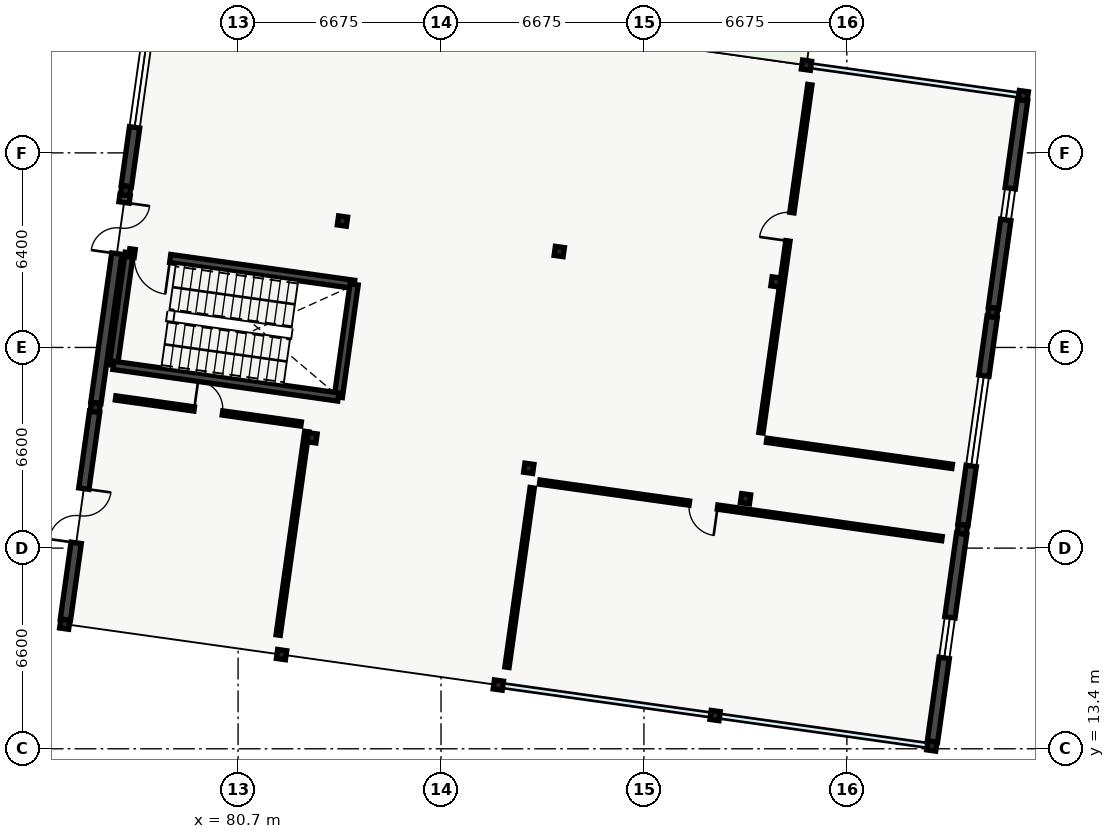
"""IFC4 building model, lengths in metres.
Left out: names, types, materials, properties, quantities, classifications, styles, units other than length and angle.
Written with IfcOpenShell. Run it as: python <this file> out.ifc"""

import sys

from ifc_helpers import new_model, si_unit, direction, frame, frame_2d, origin, origin_2d, place, context, subcontext, project, spatial, rectangle, i_section, extrude, element, fill, save


model = new_model("IFC4")
c1 = context("Model", 3, precision=1e-05, world=origin(), true_north=direction((0.0, 1.0)))
c2 = subcontext(c1, "Body", "Model", "MODEL_VIEW")
j1 = project(units=[si_unit("LENGTHUNIT", "METRE"), si_unit("PLANEANGLEUNIT", "RADIAN")], contexts=[c1])
p1 = place(None, origin())
s1 = spatial("IfcSite", under=j1, at=p1, CompositionType="ELEMENT")
p2 = place(p1, origin())
s2 = spatial("IfcBuilding", under=s1, at=p2, CompositionType="ELEMENT")
p3 = place(p2, origin())
s3 = spatial("IfcBuildingStorey", under=s2, at=p3, CompositionType="ELEMENT", Elevation=0.0)
for number, where, z_axis, x_axis in (
    (1, (75.0, 17.5, 0.0), (0.0, 0.0, 1.0), (0.99, -0.139, 0.0)),
    (2, (76.002, 24.63, 0.0), (0.0, 0.0, 1.0), (0.99, -0.139, 0.0)),
    (3, (77.004, 31.76, 0.0), (0.0, 0.0, 1.0), (0.99, -0.139, 0.0)),
    (4, (82.13, 16.498, 0.0), (0.0, 0.0, 1.0), (0.99, -0.139, 0.0)),
    (5, (83.132, 23.628, 0.0), (0.0, 0.0, 1.0), (0.99, -0.139, 0.0)),
    (6, (84.134, 30.758, 0.0), (0.0, 0.0, 1.0), (0.99, -0.139, 0.0)),
    (7, (89.26, 15.496, 0.0), (0.0, 0.0, 1.0), (0.99, -0.139, 0.0)),
    (8, (90.262, 22.626, 0.0), (0.0, 0.0, 1.0), (0.99, -0.139, 0.0)),
    (9, (91.264, 29.756, 0.0), (0.0, 0.0, 1.0), (0.99, -0.139, 0.0)),
    (10, (96.39, 14.494, 0.0), (0.0, 0.0, 1.0), (0.99, -0.139, 0.0)),
    (11, (97.392, 21.624, 0.0), (0.0, 0.0, 1.0), (0.99, -0.139, 0.0)),
    (12, (98.394, 28.754, 0.0), (0.0, 0.0, 1.0), (0.99, -0.139, 0.0)),
    (13, (99.396, 35.884, 0.0), (0.0, 0.0, 1.0), (0.99, -0.139, 0.0)),
    (14, (103.52, 13.492, 0.0), (0.0, 0.0, 1.0), (0.99, -0.139, 0.0)),
    (15, (104.522, 20.622, 0.0), (0.0, 0.0, 1.0), (0.99, -0.139, 0.0)),
    (16, (105.524, 27.752, 0.0), (0.0, 0.0, 1.0), (0.99, -0.139, 0.0)),
    (17, (106.526, 34.882, 0.0), (0.0, 0.0, 1.0), (0.99, -0.139, 0.0)),
):
    element("IfcColumn", number, at=place(p3, frame(where, z_axis=z_axis, x_axis=x_axis)), inside=s3, PredefinedType="COLUMN", context=c2, shape_type="SweptSolid", body=[
        extrude(i_section(OverallWidth=0.3, OverallDepth=0.3, WebThickness=0.011, FlangeThickness=0.019, at=origin_2d()), origin(), (0.0, 0.0, 1.0), 4.92),
    ])
p4 = place(p3, frame((75.02, 17.644, 0.0), z_axis=(0.0, 0.0, 1.0), x_axis=(0.139170380644, 0.990268451053, 0.0)))
e18 = element("IfcWall", 18, at=p4, inside=s3, PredefinedType="SOLIDWALL", context=c2, shape_type="SweptSolid", body=[
    extrude(rectangle(XDim=6.91, YDim=0.34, at=frame_2d((3.455, 0.0))), origin(), (0.0, 0.0, 1.0), 4.705),
])
p5 = place(p4, frame((2.555, 0.0, 0.0)))
e19 = element("IfcOpeningElement", 19, at=p5, cuts=e18, PredefinedType="OPENING", context=c2, shape_type="SweptSolid", body=[
    extrude(rectangle(XDim=1.8, YDim=2.25, at=frame_2d((0.9, 1.125))), frame((0.0, 0.17, 0.0), z_axis=(0.0, -1.0, 0.0), x_axis=(1.0, 0.0, 0.0)), (0.0, 0.0, 1.0), 0.34),
])
p6 = place(p3, frame((76.022, 24.773, 0.0), z_axis=(0.0, 0.0, 1.0), x_axis=(0.139170380644, 0.990268451053, 0.0)))
e20 = element("IfcWall", 20, at=p6, inside=s3, PredefinedType="SOLIDWALL", context=c2, shape_type="SweptSolid", body=[
    extrude(rectangle(XDim=6.91, YDim=0.34, at=frame_2d((3.455, 0.0))), origin(), (0.0, 0.0, 1.0), 4.705),
])
p7 = place(p6, frame((4.96, 0.0, 0.0)))
e21 = element("IfcOpeningElement", 21, at=p7, cuts=e20, PredefinedType="OPENING", context=c2, shape_type="SweptSolid", body=[
    extrude(rectangle(XDim=1.7, YDim=2.2, at=frame_2d((0.85, 1.1))), frame((0.0, 0.17, 0.0), z_axis=(0.0, -1.0, 0.0), x_axis=(1.0, 0.0, 0.0)), (0.0, 0.0, 1.0), 0.34),
])
p8 = place(p3, frame((77.024, 31.904, 0.0), z_axis=(0.0, 0.0, 1.0), x_axis=(0.139175250046, 0.990267766705, 0.0)))
e22 = element("IfcWall", 22, at=p8, inside=s3, PredefinedType="SOLIDWALL", context=c2, shape_type="SweptSolid", body=[
    extrude(rectangle(XDim=6.91, YDim=0.34, at=frame_2d((3.455, 0.0))), origin(), (0.0, 0.0, 1.0), 4.705),
])
p9 = place(p8, frame((1.955, 0.0, 0.95)))
e23 = element("IfcOpeningElement", 23, at=p9, cuts=e22, PredefinedType="OPENING", context=c2, shape_type="SweptSolid", body=[
    extrude(rectangle(XDim=3.0, YDim=1.65, at=frame_2d((1.5, 0.825))), frame((0.0, 0.17, 0.0), z_axis=(0.0, -1.0, 0.0), x_axis=(1.0, 0.0, 0.0)), (0.0, 0.0, 1.0), 0.34),
])
p10 = place(p3, frame((106.506, 34.738, 0.0), z_axis=(0.0, 0.0, 1.0), x_axis=(-0.139170380644, -0.990268451053, 0.0)))
e24 = element("IfcWall", 24, at=p10, inside=s3, PredefinedType="SOLIDWALL", context=c2, shape_type="SweptSolid", body=[
    extrude(rectangle(XDim=6.91, YDim=0.34, at=frame_2d((3.455, 0.0))), origin(), (0.0, 0.0, 1.0), 4.705),
])
p11 = place(p10, frame((2.93, 0.0, 0.95)))
e25 = element("IfcOpeningElement", 25, at=p11, cuts=e24, PredefinedType="OPENING", context=c2, shape_type="SweptSolid", body=[
    extrude(rectangle(XDim=1.05, YDim=1.2, at=frame_2d((0.525, 0.6))), frame((0.0, 0.17, 0.0), z_axis=(0.0, -1.0, 0.0), x_axis=(1.0, 0.0, 0.0)), (0.0, 0.0, 1.0), 0.34),
])
p12 = place(p3, frame((105.504, 27.608, 0.0), z_axis=(0.0, 0.0, 1.0), x_axis=(-0.139170380644, -0.990268451053, 0.0)))
e26 = element("IfcWall", 26, at=p12, inside=s3, PredefinedType="SOLIDWALL", context=c2, shape_type="SweptSolid", body=[
    extrude(rectangle(XDim=6.91, YDim=0.34, at=frame_2d((3.455, 0.0))), origin(), (0.0, 0.0, 1.0), 4.705),
])
p13 = place(p12, frame((1.955, 0.0, 0.95)))
e27 = element("IfcOpeningElement", 27, at=p13, cuts=e26, PredefinedType="OPENING", context=c2, shape_type="SweptSolid", body=[
    extrude(rectangle(XDim=3.0, YDim=1.65, at=frame_2d((1.5, 0.825))), frame((0.0, 0.17, 0.0), z_axis=(0.0, -1.0, 0.0), x_axis=(1.0, 0.0, 0.0)), (0.0, 0.0, 1.0), 0.34),
])
p14 = place(p3, frame((104.502, 20.478, 0.0), z_axis=(0.0, 0.0, 1.0), x_axis=(-0.139205027475, -0.990263581238, 0.0)))
e28 = element("IfcWall", 28, at=p14, inside=s3, PredefinedType="SOLIDWALL", context=c2, shape_type="SweptSolid", body=[
    extrude(rectangle(XDim=6.91, YDim=0.34, at=frame_2d((3.455, 0.0))), origin(), (0.0, 0.0, 1.0), 4.705),
])
p15 = place(p14, frame((2.78, 0.0, 0.95)))
e29 = element("IfcOpeningElement", 29, at=p15, cuts=e28, PredefinedType="OPENING", context=c2, shape_type="SweptSolid", body=[
    extrude(rectangle(XDim=1.35, YDim=1.8, at=frame_2d((0.675, 0.9))), frame((0.0, 0.17, 0.0), z_axis=(0.0, -1.0, 0.0), x_axis=(1.0, 0.0, 0.0)), (0.0, 0.0, 1.0), 0.34),
])
p16 = place(p3, frame((76.6, 26.01, 0.0), z_axis=(0.0, 0.0, 1.0), x_axis=(0.139172815303, 0.990268108888, 0.0)))
e30 = element("IfcWall", 30, at=p16, inside=s3, PredefinedType="SHEAR", context=c2, shape_type="SweptSolid", body=[
    extrude(rectangle(XDim=3.74, YDim=0.27, at=frame_2d((1.87, 0.0))), origin(), (0.0, 0.0, 1.0), 4.88),
])
p17 = place(p3, frame((77.12, 29.714, 0.0), z_axis=(0.0, 0.0, 1.0), x_axis=(0.990265308789, -0.139192737628, 0.0)))
e31 = element("IfcWall", 31, at=p17, inside=s3, PredefinedType="SHEAR", context=c2, shape_type="SweptSolid", body=[
    extrude(rectangle(XDim=7.47, YDim=0.27, at=frame_2d((3.735, 0.0))), origin(), (0.0, 0.0, 1.0), 4.88),
])
p18 = place(p17, frame((0.18, 0.0, 0.0)))
e32 = element("IfcOpeningElement", 32, at=p18, cuts=e31, PredefinedType="OPENING", context=c2, shape_type="SweptSolid", body=[
    extrude(rectangle(XDim=1.18, YDim=2.15, at=frame_2d((0.59, 1.075))), frame((0.0, 0.135, 0.0), z_axis=(0.0, -1.0, 0.0), x_axis=(1.0, 0.0, 0.0)), (0.0, 0.0, 1.0), 0.27),
])
p19 = place(p3, frame((84.518, 28.674, 0.0), z_axis=(0.0, 0.0, 1.0), x_axis=(-0.139172815303, -0.990268108888, 0.0)))
e33 = element("IfcWall", 33, at=p19, inside=s3, PredefinedType="SHEAR", context=c2, shape_type="SweptSolid", body=[
    extrude(rectangle(XDim=3.74, YDim=0.27, at=frame_2d((1.87, 0.0))), origin(), (0.0, 0.0, 1.0), 4.88),
])
p20 = place(p3, frame((83.997, 24.97, 0.0), z_axis=(0.0, 0.0, 1.0), x_axis=(-0.990265308789, 0.139192737628, 0.0)))
e34 = element("IfcWall", 34, at=p20, inside=s3, PredefinedType="SHEAR", context=c2, shape_type="SweptSolid", body=[
    extrude(rectangle(XDim=7.47, YDim=0.27, at=frame_2d((3.735, 0.0))), origin(), (0.0, 0.0, 1.0), 4.88),
])
p21 = place(p3, frame((82.018, 17.14, 0.0), z_axis=(0.0, 0.0, 1.0), x_axis=(0.139186215649, 0.990266225504, 0.0)))
e35 = element("IfcWall", 35, at=p21, inside=s3, PredefinedType="PARTITIONING", context=c2, shape_type="SweptSolid", body=[
    extrude(rectangle(XDim=6.76, YDim=0.14, at=frame_2d((3.38, 0.0))), origin(), (0.0, 0.0, 1.0), 4.55),
])
p22 = place(p3, frame((82.772, 24.083, 0.0), z_axis=(0.0, 0.0, 1.0), x_axis=(-0.990271090706, 0.139151596873, 0.0)))
e36 = element("IfcWall", 36, at=p22, inside=s3, PredefinedType="PARTITIONING", context=c2, shape_type="SweptSolid", body=[
    extrude(rectangle(XDim=6.16, YDim=0.14, at=frame_2d((3.08, 0.0))), origin(), (0.0, 0.0, 1.0), 4.55),
])
p23 = place(p22, frame((2.61, 0.0, 0.0)))
e37 = element("IfcOpeningElement", 37, at=p23, cuts=e36, PredefinedType="OPENING", context=c2, shape_type="SweptSolid", body=[
    extrude(rectangle(XDim=0.94, YDim=2.12, at=frame_2d((0.47, 1.06))), frame((0.0, 0.07, 0.0), z_axis=(0.0, -1.0, 0.0), x_axis=(1.0, 0.0, 0.0)), (0.0, 0.0, 1.0), 0.14),
])
p24 = place(p3, frame((103.852, 20.312, 0.0), z_axis=(0.0, 0.0, 1.0), x_axis=(-0.990267836617, 0.139174752605, 0.0)))
e38 = element("IfcWall", 38, at=p24, inside=s3, PredefinedType="PARTITIONING", context=c2, shape_type="SweptSolid", body=[
    extrude(rectangle(XDim=13.36, YDim=0.14, at=frame_2d((6.68, 0.0))), origin(), (0.0, 0.0, 1.0), 4.55),
])
p25 = place(p24, frame((7.452, 0.0, 0.0)))
e39 = element("IfcOpeningElement", 39, at=p25, cuts=e38, PredefinedType="OPENING", context=c2, shape_type="SweptSolid", body=[
    extrude(rectangle(XDim=0.94, YDim=2.12, at=frame_2d((0.47, 1.06))), frame((0.0, 0.07, 0.0), z_axis=(0.0, -1.0, 0.0), x_axis=(1.0, 0.0, 0.0)), (0.0, 0.0, 1.0), 0.14),
])
p26 = place(p3, frame((90.374, 21.984, 0.0), z_axis=(0.0, 0.0, 1.0), x_axis=(-0.139190185652, -0.990265667494, 0.0)))
e40 = element("IfcWall", 40, at=p26, inside=s3, PredefinedType="PARTITIONING", context=c2, shape_type="SweptSolid", body=[
    extrude(rectangle(XDim=5.96, YDim=0.14, at=frame_2d((2.98, 0.0))), origin(), (0.0, 0.0, 1.0), 4.55),
])
p27 = place(p3, frame((98.086, 23.546, 0.0), z_axis=(0.0, 0.0, 1.0), x_axis=(0.990264860737, -0.139195925191, 0.0)))
e41 = element("IfcWall", 41, at=p27, inside=s3, PredefinedType="PARTITIONING", context=c2, shape_type="SweptSolid", body=[
    extrude(rectangle(XDim=6.16, YDim=0.14, at=frame_2d((3.08, 0.0))), origin(), (0.0, 0.0, 1.0), 4.55),
])
p28 = place(p3, frame((99.508, 35.242, 0.0), z_axis=(0.0, 0.0, 1.0), x_axis=(-0.139176845422, -0.990267542485, 0.0)))
e42 = element("IfcWall", 42, at=p28, inside=s3, PredefinedType="PARTITIONING", context=c2, shape_type="SweptSolid", body=[
    extrude(rectangle(XDim=11.56, YDim=0.14, at=frame_2d((5.78, 0.0))), origin(), (0.0, 0.0, 1.0), 3.66),
])
p29 = place(p28, frame((4.248, 0.0, 0.0)))
e43 = element("IfcOpeningElement", 43, at=p29, cuts=e42, PredefinedType="OPENING", context=c2, shape_type="SweptSolid", body=[
    extrude(rectangle(XDim=0.94, YDim=2.12, at=frame_2d((0.47, 1.06))), frame((0.0, 0.07, 0.0), z_axis=(0.0, -1.0, 0.0), x_axis=(1.0, 0.0, 0.0)), (0.0, 0.0, 1.0), 0.14),
])
p30 = place(p5, origin())
e44 = element("IfcDoor", 44, at=p30, inside=s3, OperationType="DOUBLE_DOOR_SINGLE_SWING", PredefinedType="DOOR", context=c2, shape_type="SweptSolid", body=[
    extrude(rectangle(XDim=1.8, YDim=2.25, at=frame_2d((0.9, 1.125))), frame((0.0, 0.025, 0.0), z_axis=(0.0, -1.0, 0.0), x_axis=(1.0, 0.0, 0.0)), (0.0, 0.0, 1.0), 0.05),
])
fill(e19, e44)
p31 = place(p7, origin())
e45 = element("IfcDoor", 45, at=p31, inside=s3, OperationType="DOUBLE_DOOR_SINGLE_SWING", PredefinedType="DOOR", context=c2, shape_type="SweptSolid", body=[
    extrude(rectangle(XDim=1.7, YDim=2.2, at=frame_2d((0.85, 1.1))), frame((0.0, 0.025, 0.0), z_axis=(0.0, -1.0, 0.0), x_axis=(1.0, 0.0, 0.0)), (0.0, 0.0, 1.0), 0.05),
])
fill(e21, e45)
p32 = place(p9, origin())
e46 = element("IfcWindow", 46, at=p32, inside=s3, PartitioningType="SINGLE_PANEL", PredefinedType="WINDOW", context=c2, shape_type="SweptSolid", body=[
    extrude(rectangle(XDim=3.0, YDim=1.65, at=frame_2d((1.5, 0.825))), frame((0.0, 0.03, 0.0), z_axis=(0.0, -1.0, 0.0), x_axis=(1.0, 0.0, 0.0)), (0.0, 0.0, 1.0), 0.06),
])
fill(e23, e46)
p33 = place(p11, origin())
e47 = element("IfcWindow", 47, at=p33, inside=s3, PartitioningType="SINGLE_PANEL", PredefinedType="WINDOW", context=c2, shape_type="SweptSolid", body=[
    extrude(rectangle(XDim=1.05, YDim=1.2, at=frame_2d((0.525, 0.6))), frame((0.0, 0.03, 0.0), z_axis=(0.0, -1.0, 0.0), x_axis=(1.0, 0.0, 0.0)), (0.0, 0.0, 1.0), 0.06),
])
fill(e25, e47)
p34 = place(p13, origin())
e48 = element("IfcWindow", 48, at=p34, inside=s3, PartitioningType="SINGLE_PANEL", PredefinedType="WINDOW", context=c2, shape_type="SweptSolid", body=[
    extrude(rectangle(XDim=3.0, YDim=1.65, at=frame_2d((1.5, 0.825))), frame((0.0, 0.03, 0.0), z_axis=(0.0, -1.0, 0.0), x_axis=(1.0, 0.0, 0.0)), (0.0, 0.0, 1.0), 0.06),
])
fill(e27, e48)
p35 = place(p15, origin())
e49 = element("IfcWindow", 49, at=p35, inside=s3, PartitioningType="SINGLE_PANEL", PredefinedType="WINDOW", context=c2, shape_type="SweptSolid", body=[
    extrude(rectangle(XDim=1.35, YDim=1.8, at=frame_2d((0.675, 0.9))), frame((0.0, 0.03, 0.0), z_axis=(0.0, -1.0, 0.0), x_axis=(1.0, 0.0, 0.0)), (0.0, 0.0, 1.0), 0.06),
])
fill(e29, e49)
p36 = place(p18, origin())
e50 = element("IfcDoor", 50, at=p36, inside=s3, OperationType="SINGLE_SWING_RIGHT", PredefinedType="DOOR", context=c2, shape_type="SweptSolid", body=[
    extrude(rectangle(XDim=1.18, YDim=2.15, at=frame_2d((0.59, 1.075))), frame((0.0, 0.025, 0.0), z_axis=(0.0, -1.0, 0.0), x_axis=(1.0, 0.0, 0.0)), (0.0, 0.0, 1.0), 0.05),
])
fill(e32, e50)
p37 = place(p23, origin())
e51 = element("IfcDoor", 51, at=p37, inside=s3, OperationType="SINGLE_SWING_RIGHT", PredefinedType="DOOR", context=c2, shape_type="SweptSolid", body=[
    extrude(rectangle(XDim=0.94, YDim=2.12, at=frame_2d((0.47, 1.06))), frame((0.0, 0.025, 0.0), z_axis=(0.0, -1.0, 0.0), x_axis=(1.0, 0.0, 0.0)), (0.0, 0.0, 1.0), 0.05),
])
fill(e37, e51)
p38 = place(p25, origin())
e52 = element("IfcDoor", 52, at=p38, inside=s3, OperationType="SINGLE_SWING_LEFT", PredefinedType="DOOR", context=c2, shape_type="SweptSolid", body=[
    extrude(rectangle(XDim=0.94, YDim=2.12, at=frame_2d((0.47, 1.06))), frame((0.0, 0.025, 0.0), z_axis=(0.0, -1.0, 0.0), x_axis=(1.0, 0.0, 0.0)), (0.0, 0.0, 1.0), 0.05),
])
fill(e39, e52)
p39 = place(p29, origin())
e53 = element("IfcDoor", 53, at=p39, inside=s3, OperationType="SINGLE_SWING_RIGHT", PredefinedType="DOOR", context=c2, shape_type="SweptSolid", body=[
    extrude(rectangle(XDim=0.94, YDim=2.12, at=frame_2d((0.47, 1.06))), frame((0.0, 0.025, 0.0), z_axis=(0.0, -1.0, 0.0), x_axis=(1.0, 0.0, 0.0)), (0.0, 0.0, 1.0), 0.05),
])
fill(e43, e53)
save(model, sys.argv[1])
